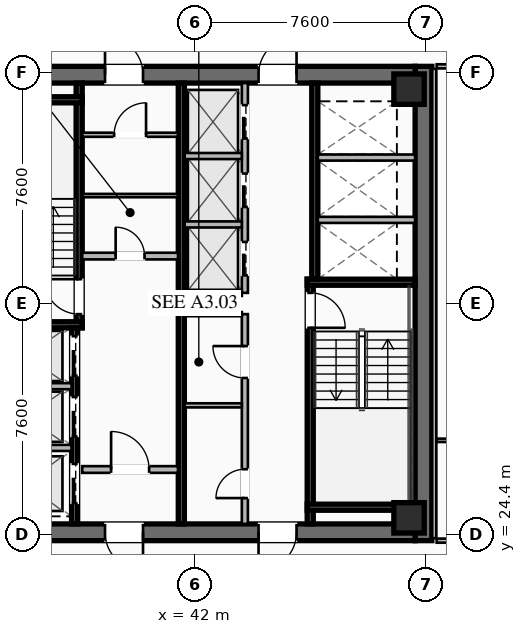
"""IFC4 building model, lengths in metres.
Left out: names, types, materials, properties, quantities, classifications, styles, units other than length and angle.
Written with IfcOpenShell. Run it as: python <this file> out.ifc"""

import sys

from ifc_helpers import new_model, si_unit, direction, frame, frame_2d, origin, origin_2d, place, context, subcontext, project, spatial, rectangle, hollow_rectangle, extrude, element, fill, save


model = new_model("IFC4")
c1 = context("Model", 3, precision=1e-05, world=origin(), true_north=direction((0.0, 1.0)))
c2 = subcontext(c1, "Body", "Model", "MODEL_VIEW")
j1 = project(units=[si_unit("LENGTHUNIT", "METRE"), si_unit("PLANEANGLEUNIT", "RADIAN")], contexts=[c1])
p1 = place(None, origin())
s1 = spatial("IfcSite", under=j1, at=p1, CompositionType="ELEMENT")
p2 = place(p1, origin())
s2 = spatial("IfcBuilding", under=s1, at=p2, CompositionType="ELEMENT")
p3 = place(p2, frame((0.0, 0.0, 128.6)))
s3 = spatial("IfcBuildingStorey", under=s2, at=p3, CompositionType="ELEMENT", Elevation=128.6)
p4 = place(p3, frame((49.525, 39.8, 0.0), z_axis=(0.0, 0.0, 1.0), x_axis=(0.0, -1.0, 0.0)))
e1 = element("IfcWall", 1, at=p4, inside=s3, PredefinedType="SHEAR", context=c2, shape_type="SweptSolid", body=[
    extrude(rectangle(XDim=15.6, YDim=0.55, at=frame_2d((7.8, 0.0))), origin(), (0.0, 0.0, 1.0), 3.55),
])
p5 = place(p3, frame((49.25, 24.475, 0.0), z_axis=(0.0, 0.0, 1.0), x_axis=(-1.0, 0.0, 0.0)))
e2 = element("IfcWall", 2, at=p5, inside=s3, PredefinedType="SHEAR", context=c2, shape_type="SweptSolid", body=[
    extrude(rectangle(XDim=14.5, YDim=0.55, at=frame_2d((7.25, 0.0))), origin(), (0.0, 0.0, 1.0), 3.55),
])
p6 = place(p5, frame((8.95, 0.0, 0.0)))
e3 = element("IfcOpeningElement", 3, at=p6, cuts=e2, PredefinedType="OPENING", context=c2, shape_type="SweptSolid", body=[
    extrude(rectangle(XDim=1.25, YDim=2.25, at=frame_2d((0.625, 1.125))), frame((0.0, 0.285, 0.0), z_axis=(0.0, -1.0, 0.0), x_axis=(1.0, 0.0, 0.0)), (0.0, 0.0, 1.0), 0.57),
])
p7 = place(p5, frame((3.9, 0.0, 0.0)))
e4 = element("IfcOpeningElement", 4, at=p7, cuts=e2, PredefinedType="OPENING", context=c2, shape_type="SweptSolid", body=[
    extrude(rectangle(XDim=1.25, YDim=2.25, at=frame_2d((0.625, 1.125))), frame((0.0, 0.285, 0.0), z_axis=(0.0, -1.0, 0.0), x_axis=(1.0, 0.0, 0.0)), (0.0, 0.0, 1.0), 0.57),
])
p8 = place(p3, frame((34.75, 39.525, 0.0), z_axis=(0.0, 0.0, 1.0), x_axis=(1.0, 0.0, 0.0)))
e5 = element("IfcWall", 5, at=p8, inside=s3, PredefinedType="SHEAR", context=c2, shape_type="SweptSolid", body=[
    extrude(rectangle(XDim=14.5, YDim=0.55, at=frame_2d((7.25, 0.0))), origin(), (0.0, 0.0, 1.0), 3.55),
])
p9 = place(p8, frame((4.3, 0.0, 0.0)))
e6 = element("IfcOpeningElement", 6, at=p9, cuts=e5, PredefinedType="OPENING", context=c2, shape_type="SweptSolid", body=[
    extrude(rectangle(XDim=1.25, YDim=2.25, at=frame_2d((0.625, 1.125))), frame((0.0, 0.285, 0.0), z_axis=(0.0, -1.0, 0.0), x_axis=(1.0, 0.0, 0.0)), (0.0, 0.0, 1.0), 0.57),
])
p10 = place(p8, frame((9.35, 0.0, 0.0)))
e7 = element("IfcOpeningElement", 7, at=p10, cuts=e5, PredefinedType="OPENING", context=c2, shape_type="SweptSolid", body=[
    extrude(rectangle(XDim=1.25, YDim=2.25, at=frame_2d((0.625, 1.125))), frame((0.0, 0.285, 0.0), z_axis=(0.0, -1.0, 0.0), x_axis=(1.0, 0.0, 0.0)), (0.0, 0.0, 1.0), 0.57),
])
for number, where, z_axis, x_axis in (
    (8, (49.05, 24.95, 0.0), (0.0, 0.0, 1.0), (1.0, 0.0, 0.0)),
    (9, (49.05, 39.05, 0.0), (0.0, 0.0, 1.0), (1.0, 0.0, 0.0)),
):
    element("IfcColumn", number, at=place(p3, frame(where, z_axis=z_axis, x_axis=x_axis)), inside=s3, PredefinedType="COLUMN", context=c2, shape_type="SweptSolid", body=[
        extrude(hollow_rectangle(XDim=1.0, YDim=1.0, WallThickness=0.04, at=origin_2d()), origin(), (0.0, 0.0, 1.0), 3.37),
    ])
p11 = place(p3, frame((38.2, 31.2, 0.0), z_axis=(0.0, 0.0, 1.0), x_axis=(0.0, 1.0, 0.0)))
e10 = element("IfcWall", 10, at=p11, inside=s3, PredefinedType="SHEAR", context=c2, shape_type="SweptSolid", body=[
    extrude(rectangle(XDim=8.05, YDim=0.2, at=frame_2d((4.025, 0.0))), origin(), (0.0, 0.0, 1.0), 3.37),
])
p12 = place(p11, frame((0.45, 0.0, 0.0)))
e11 = element("IfcOpeningElement", 11, at=p12, cuts=e10, PredefinedType="OPENING", context=c2, shape_type="SweptSolid", body=[
    extrude(rectangle(XDim=1.15, YDim=2.2, at=frame_2d((0.575, 1.1))), frame((0.0, 0.11, 0.0), z_axis=(0.0, -1.0, 0.0), x_axis=(1.0, 0.0, 0.0)), (0.0, 0.0, 1.0), 0.22),
])
for number, where, z_axis, x_axis in (
    (12, (34.75, 31.3, 0.0), (0.0, 0.0, 1.0), (1.0, 0.0, 0.0)),
    (13, (34.75, 38.7, 0.0), (0.0, 0.0, 1.0), (1.0, 0.0, 0.0)),
):
    element("IfcWall", number, at=place(p3, frame(where, z_axis=z_axis, x_axis=x_axis)), inside=s3, PredefinedType="SHEAR", context=c2, shape_type="SweptSolid", body=[
        extrude(rectangle(XDim=3.55, YDim=0.2, at=frame_2d((1.775, 0.0))), origin(), (0.0, 0.0, 1.0), 3.37),
    ])
p13 = place(p3, frame((45.8, 32.8, 0.0), z_axis=(0.0, 0.0, 1.0), x_axis=(0.0, -1.0, 0.0)))
e14 = element("IfcWall", 14, at=p13, inside=s3, PredefinedType="SHEAR", context=c2, shape_type="SweptSolid", body=[
    extrude(rectangle(XDim=8.05, YDim=0.2, at=frame_2d((4.025, 0.0))), origin(), (0.0, 0.0, 1.0), 3.37),
])
p14 = place(p13, frame((0.45, 0.0, 0.0)))
e15 = element("IfcOpeningElement", 15, at=p14, cuts=e14, PredefinedType="OPENING", context=c2, shape_type="SweptSolid", body=[
    extrude(rectangle(XDim=1.15, YDim=2.2, at=frame_2d((0.575, 1.1))), frame((0.0, 0.11, 0.0), z_axis=(0.0, -1.0, 0.0), x_axis=(1.0, 0.0, 0.0)), (0.0, 0.0, 1.0), 0.22),
])
for number, where, z_axis, x_axis in (
    (16, (45.7, 32.7, 0.0), (0.0, 0.0, 1.0), (1.0, 0.0, 0.0)),
    (17, (45.7, 25.3, 0.0), (0.0, 0.0, 1.0), (1.0, 0.0, 0.0)),
):
    element("IfcWall", number, at=place(p3, frame(where, z_axis=z_axis, x_axis=x_axis)), inside=s3, PredefinedType="SHEAR", context=c2, shape_type="SweptSolid", body=[
        extrude(rectangle(XDim=3.55, YDim=0.2, at=frame_2d((1.775, 0.0))), origin(), (0.0, 0.0, 1.0), 3.37),
    ])
p15 = place(p3, frame((41.56, 24.75, 0.0), z_axis=(0.0, 0.0, 1.0), x_axis=(0.0, 1.0, 0.0)))
e18 = element("IfcWall", 18, at=p15, inside=s3, PredefinedType="SHEAR", context=c2, shape_type="SweptSolid", body=[
    extrude(rectangle(XDim=14.5, YDim=0.2, at=frame_2d((7.25, 0.0))), origin(), (0.0, 0.0, 1.0), 3.37),
])
p16 = place(p3, frame((38.3, 33.56, 0.0), z_axis=(0.0, 0.0, 1.0), x_axis=(1.0, 0.0, 0.0)))
e19 = element("IfcWall", 19, at=p16, inside=s3, PredefinedType="SOLIDWALL", context=c2, shape_type="SweptSolid", body=[
    extrude(rectangle(XDim=3.15, YDim=0.22, at=frame_2d((1.575, 0.0))), origin(), (0.0, 0.0, 1.0), 2.723),
])
p17 = place(p16, frame((1.1, 0.0, 0.0)))
e20 = element("IfcOpeningElement", 20, at=p17, cuts=e19, PredefinedType="OPENING", context=c2, shape_type="SweptSolid", body=[
    extrude(rectangle(XDim=0.95, YDim=2.05, at=frame_2d((0.475, 1.025))), frame((0.0, 0.12, 0.0), z_axis=(0.0, -1.0, 0.0), x_axis=(1.0, 0.0, 0.0)), (0.0, 0.0, 1.0), 0.24),
])
p18 = place(p3, frame((38.3, 26.54, 0.0), z_axis=(0.0, 0.0, 1.0), x_axis=(1.0, 0.0, 0.0)))
e21 = element("IfcWall", 21, at=p18, inside=s3, PredefinedType="SOLIDWALL", context=c2, shape_type="SweptSolid", body=[
    extrude(rectangle(XDim=3.15, YDim=0.22, at=frame_2d((1.575, 0.0))), origin(), (0.0, 0.0, 1.0), 2.723),
])
p19 = place(p18, frame((0.95, 0.0, 0.0)))
e22 = element("IfcOpeningElement", 22, at=p19, cuts=e21, PredefinedType="OPENING", context=c2, shape_type="SweptSolid", body=[
    extrude(rectangle(XDim=1.25, YDim=2.25, at=frame_2d((0.625, 1.125))), frame((0.0, 0.12, 0.0), z_axis=(0.0, -1.0, 0.0), x_axis=(1.0, 0.0, 0.0)), (0.0, 0.0, 1.0), 0.24),
])
p20 = place(p3, frame((38.05, 24.75, 0.0), z_axis=(0.0, 0.0, 1.0), x_axis=(0.0, 1.0, 0.0)))
e23 = element("IfcWall", 23, at=p20, inside=s3, PredefinedType="SHEAR", context=c2, shape_type="SweptSolid", body=[
    extrude(rectangle(XDim=6.45, YDim=0.2, at=frame_2d((3.225, 0.0))), origin(), (0.0, 0.0, 1.0), 3.37),
])
p21 = place(p20, frame((4.875, 0.0, 0.0)))
e24 = element("IfcOpeningElement", 24, at=p21, cuts=e23, PredefinedType="OPENING", context=c2, shape_type="SweptSolid", body=[
    extrude(rectangle(XDim=1.3, YDim=2.25, at=frame_2d((0.65, 1.125))), frame((0.0, 0.11, 0.0), z_axis=(0.0, -1.0, 0.0), x_axis=(1.0, 0.0, 0.0)), (0.0, 0.0, 1.0), 0.22),
])
p22 = place(p20, frame((2.875, 0.0, 0.0)))
e25 = element("IfcOpeningElement", 25, at=p22, cuts=e23, PredefinedType="OPENING", context=c2, shape_type="SweptSolid", body=[
    extrude(rectangle(XDim=1.3, YDim=2.25, at=frame_2d((0.65, 1.125))), frame((0.0, 0.11, 0.0), z_axis=(0.0, -1.0, 0.0), x_axis=(1.0, 0.0, 0.0)), (0.0, 0.0, 1.0), 0.22),
])
p23 = place(p20, frame((0.675, 0.0, 0.0)))
e26 = element("IfcOpeningElement", 26, at=p23, cuts=e23, PredefinedType="OPENING", context=c2, shape_type="SweptSolid", body=[
    extrude(rectangle(XDim=1.3, YDim=2.25, at=frame_2d((0.65, 1.125))), frame((0.0, 0.11, 0.0), z_axis=(0.0, -1.0, 0.0), x_axis=(1.0, 0.0, 0.0)), (0.0, 0.0, 1.0), 0.22),
])
for number, where, z_axis, x_axis in (
    (27, (34.75, 27.25, 0.0), (0.0, 0.0, 1.0), (1.0, 0.0, 0.0)),
    (28, (34.75, 29.28, 0.0), (0.0, 0.0, 1.0), (1.0, 0.0, 0.0)),
):
    element("IfcWall", number, at=place(p3, frame(where, z_axis=z_axis, x_axis=x_axis)), inside=s3, PredefinedType="SOLIDWALL", context=c2, shape_type="SweptSolid", body=[
        extrude(rectangle(XDim=3.2, YDim=0.2, at=frame_2d((1.6, 0.0))), origin(), (0.0, 0.0, 1.0), 3.37),
    ])
p24 = place(p3, frame((45.95, 39.25, 0.0), z_axis=(0.0, 0.0, 1.0), x_axis=(0.0, -1.0, 0.0)))
e29 = element("IfcWall", 29, at=p24, inside=s3, PredefinedType="SHEAR", context=c2, shape_type="SweptSolid", body=[
    extrude(rectangle(XDim=6.45, YDim=0.2, at=frame_2d((3.225, 0.0))), origin(), (0.0, 0.0, 1.0), 3.37),
])
for number, where, z_axis, x_axis in (
    (30, (46.05, 34.75, 0.0), (0.0, 0.0, 1.0), (1.0, 0.0, 0.0)),
    (31, (46.05, 36.8, 0.0), (0.0, 0.0, 1.0), (1.0, 0.0, 0.0)),
):
    element("IfcWall", number, at=place(p3, frame(where, z_axis=z_axis, x_axis=x_axis)), inside=s3, PredefinedType="SOLIDWALL", context=c2, shape_type="SweptSolid", body=[
        extrude(rectangle(XDim=3.2, YDim=0.2, at=frame_2d((1.6, 0.0))), origin(), (0.0, 0.0, 1.0), 3.37),
    ])
p25 = place(p3, frame((38.3, 37.55, 0.0), z_axis=(0.0, 0.0, 1.0), x_axis=(1.0, 0.0, 0.0)))
e32 = element("IfcWall", 32, at=p25, inside=s3, PredefinedType="PARTITIONING", context=c2, shape_type="SweptSolid", body=[
    extrude(rectangle(XDim=3.15, YDim=0.135, at=frame_2d((1.575, 0.0))), origin(), (0.0, 0.0, 1.0), 2.723),
])
p26 = place(p25, frame((1.05, 0.0, 0.0)))
e33 = element("IfcOpeningElement", 33, at=p26, cuts=e32, PredefinedType="OPENING", context=c2, shape_type="SweptSolid", body=[
    extrude(rectangle(XDim=1.05, YDim=2.2, at=frame_2d((0.525, 1.1))), frame((0.0, 0.077, 0.0), z_axis=(0.0, -1.0, 0.0), x_axis=(1.0, 0.0, 0.0)), (0.0, 0.0, 1.0), 0.155),
])
p27 = place(p3, frame((38.3, 35.55, 0.0), z_axis=(0.0, 0.0, 1.0), x_axis=(1.0, 0.0, 0.0)))
e34 = element("IfcWall", 34, at=p27, inside=s3, PredefinedType="PARTITIONING", context=c2, shape_type="SweptSolid", body=[
    extrude(rectangle(XDim=3.15, YDim=0.11, at=frame_2d((1.575, 0.0))), origin(), (0.0, 0.0, 1.0), 2.723),
])
p28 = place(p3, frame((43.65, 24.75, 0.0), z_axis=(0.0, 0.0, 1.0), x_axis=(0.0, 1.0, 0.0)))
e35 = element("IfcWall", 35, at=p28, inside=s3, PredefinedType="SOLIDWALL", context=c2, shape_type="SweptSolid", body=[
    extrude(rectangle(XDim=6.9, YDim=0.2, at=frame_2d((3.45, 0.0))), origin(), (0.0, 0.0, 1.0), 2.723),
])
p29 = place(p28, frame((0.85, 0.0, 0.0)))
e36 = element("IfcOpeningElement", 36, at=p29, cuts=e35, PredefinedType="OPENING", context=c2, shape_type="SweptSolid", body=[
    extrude(rectangle(XDim=0.95, YDim=2.05, at=frame_2d((0.475, 1.025))), frame((0.0, 0.11, 0.0), z_axis=(0.0, -1.0, 0.0), x_axis=(1.0, 0.0, 0.0)), (0.0, 0.0, 1.0), 0.22),
])
p30 = place(p28, frame((4.8, 0.0, 0.0)))
e37 = element("IfcOpeningElement", 37, at=p30, cuts=e35, PredefinedType="OPENING", context=c2, shape_type="SweptSolid", body=[
    extrude(rectangle(XDim=1.05, YDim=2.2, at=frame_2d((0.525, 1.1))), frame((0.0, 0.11, 0.0), z_axis=(0.0, -1.0, 0.0), x_axis=(1.0, 0.0, 0.0)), (0.0, 0.0, 1.0), 0.22),
])
for number, where, z_axis, x_axis in (
    (38, (41.67, 31.65, 0.0), (0.0, 0.0, 1.0), (1.0, 0.0, 0.0)),
    (39, (41.67, 28.65, 0.0), (0.0, 0.0, 1.0), (1.0, 0.0, 0.0)),
):
    element("IfcWall", number, at=place(p3, frame(where, z_axis=z_axis, x_axis=x_axis)), inside=s3, PredefinedType="PARTITIONING", context=c2, shape_type="SweptSolid", body=[
        extrude(rectangle(XDim=1.88, YDim=0.135, at=frame_2d((0.94, 0.0))), origin(), (0.0, 0.0, 1.0), 2.723),
    ])
p31 = place(p3, frame((43.65, 32.35, 0.0), z_axis=(0.0, 0.0, 1.0), x_axis=(0.0, 1.0, 0.0)))
e40 = element("IfcWall", 40, at=p31, inside=s3, PredefinedType="SOLIDWALL", context=c2, shape_type="SweptSolid", body=[
    extrude(rectangle(XDim=6.9, YDim=0.2, at=frame_2d((3.45, 0.0))), origin(), (0.0, 0.0, 1.0), 3.37),
])
p32 = place(p31, frame((0.575, 0.0, 0.0)))
e41 = element("IfcOpeningElement", 41, at=p32, cuts=e40, PredefinedType="OPENING", context=c2, shape_type="SweptSolid", body=[
    extrude(rectangle(XDim=1.1, YDim=2.2, at=frame_2d((0.55, 1.1))), frame((0.0, 0.11, 0.0), z_axis=(0.0, -1.0, 0.0), x_axis=(1.0, 0.0, 0.0)), (0.0, 0.0, 1.0), 0.22),
])
p33 = place(p31, frame((2.825, 0.0, 0.0)))
e42 = element("IfcOpeningElement", 42, at=p33, cuts=e40, PredefinedType="OPENING", context=c2, shape_type="SweptSolid", body=[
    extrude(rectangle(XDim=1.1, YDim=2.2, at=frame_2d((0.55, 1.1))), frame((0.0, 0.11, 0.0), z_axis=(0.0, -1.0, 0.0), x_axis=(1.0, 0.0, 0.0)), (0.0, 0.0, 1.0), 0.22),
])
p34 = place(p31, frame((5.075, 0.0, 0.0)))
e43 = element("IfcOpeningElement", 43, at=p34, cuts=e40, PredefinedType="OPENING", context=c2, shape_type="SweptSolid", body=[
    extrude(rectangle(XDim=1.1, YDim=2.2, at=frame_2d((0.55, 1.1))), frame((0.0, 0.11, 0.0), z_axis=(0.0, -1.0, 0.0), x_axis=(1.0, 0.0, 0.0)), (0.0, 0.0, 1.0), 0.22),
])
for number, where, z_axis, x_axis in (
    (44, (41.67, 32.35, 0.0), (0.0, 0.0, 1.0), (1.0, 0.0, 0.0)),
    (45, (41.67, 34.6, 0.0), (0.0, 0.0, 1.0), (1.0, 0.0, 0.0)),
    (46, (41.67, 36.85, 0.0), (0.0, 0.0, 1.0), (1.0, 0.0, 0.0)),
):
    element("IfcWall", number, at=place(p3, frame(where, z_axis=z_axis, x_axis=x_axis)), inside=s3, PredefinedType="SOLIDWALL", context=c2, shape_type="SweptSolid", body=[
        extrude(rectangle(XDim=1.88, YDim=0.2, at=frame_2d((0.94, 0.0))), origin(), (0.0, 0.0, 1.0), 3.37),
    ])
p35 = place(p3, frame((49.88, 39.72, 0.0), z_axis=(0.0, 0.0, 1.0), x_axis=(0.0, -1.0, 0.0)))
e47 = element("IfcWall", 47, at=p35, inside=s3, PredefinedType="PARTITIONING", context=c2, shape_type="SweptSolid", body=[
    extrude(rectangle(XDim=15.44, YDim=0.135, at=frame_2d((7.72, 0.0))), origin(), (0.0, 0.0, 1.0), 2.723),
])
p36 = place(p3, frame((61.28, 39.8, 0.0), z_axis=(0.0, 0.0, 1.0), x_axis=(-1.0, 0.0, 0.0)))
e48 = element("IfcWall", 48, at=p36, inside=s3, PredefinedType="PARTITIONING", context=c2, shape_type="SweptSolid", body=[
    extrude(rectangle(XDim=11.32, YDim=0.135, at=frame_2d((5.66, 0.0))), origin(), (0.0, 0.0, 1.0), 2.723),
])
p37 = place(p36, frame((9.88, 0.0, 0.0)))
e49 = element("IfcOpeningElement", 49, at=p37, cuts=e48, PredefinedType="OPENING", context=c2, shape_type="SweptSolid", body=[
    extrude(rectangle(XDim=0.95, YDim=2.05, at=frame_2d((0.475, 1.025))), frame((0.0, 0.077, 0.0), z_axis=(0.0, -1.0, 0.0), x_axis=(1.0, 0.0, 0.0)), (0.0, 0.0, 1.0), 0.155),
])
p38 = place(p3, frame((49.96, 24.2, 0.0), z_axis=(0.0, 0.0, 1.0), x_axis=(1.0, 0.0, 0.0)))
e50 = element("IfcWall", 50, at=p38, inside=s3, PredefinedType="PARTITIONING", context=c2, shape_type="SweptSolid", body=[
    extrude(rectangle(XDim=11.32, YDim=0.135, at=frame_2d((5.66, 0.0))), origin(), (0.0, 0.0, 1.0), 2.723),
])
p39 = place(p38, frame((0.5, 0.0, 0.0)))
e51 = element("IfcOpeningElement", 51, at=p39, cuts=e50, PredefinedType="OPENING", context=c2, shape_type="SweptSolid", body=[
    extrude(rectangle(XDim=0.95, YDim=2.05, at=frame_2d((0.475, 1.025))), frame((0.0, 0.077, 0.0), z_axis=(0.0, -1.0, 0.0), x_axis=(1.0, 0.0, 0.0)), (0.0, 0.0, 1.0), 0.155),
])
p40 = place(p3, frame((49.96, 27.5, 0.0), z_axis=(0.0, 0.0, 1.0), x_axis=(1.0, 0.0, 0.0)))
e52 = element("IfcWall", 52, at=p40, inside=s3, PredefinedType="PARTITIONING", context=c2, shape_type="SweptSolid", body=[
    extrude(rectangle(XDim=11.32, YDim=0.11, at=frame_2d((5.66, 0.0))), origin(), (0.0, 0.0, 1.0), 2.723),
])
p41 = place(p9, origin())
e53 = element("IfcDoor", 53, at=p41, inside=s3, OperationType="SINGLE_SWING_LEFT", PredefinedType="DOOR", context=c2, shape_type="SweptSolid", body=[
    extrude(rectangle(XDim=1.25, YDim=2.25, at=frame_2d((0.625, 1.125))), frame((0.0, 0.025, 0.0), z_axis=(0.0, -1.0, 0.0), x_axis=(1.0, 0.0, 0.0)), (0.0, 0.0, 1.0), 0.05),
])
fill(e6, e53)
p42 = place(p10, origin())
e54 = element("IfcDoor", 54, at=p42, inside=s3, OperationType="SINGLE_SWING_RIGHT", PredefinedType="DOOR", context=c2, shape_type="SweptSolid", body=[
    extrude(rectangle(XDim=1.25, YDim=2.25, at=frame_2d((0.625, 1.125))), frame((0.0, 0.025, 0.0), z_axis=(0.0, -1.0, 0.0), x_axis=(1.0, 0.0, 0.0)), (0.0, 0.0, 1.0), 0.05),
])
fill(e7, e54)
p43 = place(p6, origin())
e55 = element("IfcDoor", 55, at=p43, inside=s3, OperationType="SINGLE_SWING_LEFT", PredefinedType="DOOR", context=c2, shape_type="SweptSolid", body=[
    extrude(rectangle(XDim=1.25, YDim=2.25, at=frame_2d((0.625, 1.125))), frame((0.0, 0.025, 0.0), z_axis=(0.0, -1.0, 0.0), x_axis=(1.0, 0.0, 0.0)), (0.0, 0.0, 1.0), 0.05),
])
fill(e3, e55)
p44 = place(p7, origin())
e56 = element("IfcDoor", 56, at=p44, inside=s3, OperationType="SINGLE_SWING_RIGHT", PredefinedType="DOOR", context=c2, shape_type="SweptSolid", body=[
    extrude(rectangle(XDim=1.25, YDim=2.25, at=frame_2d((0.625, 1.125))), frame((0.0, 0.025, 0.0), z_axis=(0.0, -1.0, 0.0), x_axis=(1.0, 0.0, 0.0)), (0.0, 0.0, 1.0), 0.05),
])
fill(e4, e56)
p45 = place(p12, origin())
e57 = element("IfcDoor", 57, at=p45, inside=s3, OperationType="SINGLE_SWING_RIGHT", PredefinedType="DOOR", context=c2, shape_type="SweptSolid", body=[
    extrude(rectangle(XDim=1.15, YDim=2.2, at=frame_2d((0.575, 1.1))), frame((0.0, 0.025, 0.0), z_axis=(0.0, -1.0, 0.0), x_axis=(1.0, 0.0, 0.0)), (0.0, 0.0, 1.0), 0.05),
])
fill(e11, e57)
p46 = place(p14, origin())
e58 = element("IfcDoor", 58, at=p46, inside=s3, OperationType="SINGLE_SWING_RIGHT", PredefinedType="DOOR", context=c2, shape_type="SweptSolid", body=[
    extrude(rectangle(XDim=1.15, YDim=2.2, at=frame_2d((0.575, 1.1))), frame((0.0, 0.025, 0.0), z_axis=(0.0, -1.0, 0.0), x_axis=(1.0, 0.0, 0.0)), (0.0, 0.0, 1.0), 0.05),
])
fill(e15, e58)
p47 = place(p19, origin())
e59 = element("IfcDoor", 59, at=p47, inside=s3, OperationType="SINGLE_SWING_LEFT", PredefinedType="DOOR", context=c2, shape_type="SweptSolid", body=[
    extrude(rectangle(XDim=1.25, YDim=2.25, at=frame_2d((0.625, 1.125))), frame((0.0, 0.025, 0.0), z_axis=(0.0, -1.0, 0.0), x_axis=(1.0, 0.0, 0.0)), (0.0, 0.0, 1.0), 0.05),
])
fill(e22, e59)
p48 = place(p26, origin())
e60 = element("IfcDoor", 60, at=p48, inside=s3, OperationType="SINGLE_SWING_RIGHT", PredefinedType="DOOR", context=c2, shape_type="SweptSolid", body=[
    extrude(rectangle(XDim=1.05, YDim=2.2, at=frame_2d((0.525, 1.1))), frame((0.0, 0.025, 0.0), z_axis=(0.0, -1.0, 0.0), x_axis=(1.0, 0.0, 0.0)), (0.0, 0.0, 1.0), 0.05),
])
fill(e33, e60)
p49 = place(p17, origin())
e61 = element("IfcDoor", 61, at=p49, inside=s3, OperationType="SINGLE_SWING_LEFT", PredefinedType="DOOR", context=c2, shape_type="SweptSolid", body=[
    extrude(rectangle(XDim=0.95, YDim=2.05, at=frame_2d((0.475, 1.025))), frame((0.0, 0.025, 0.0), z_axis=(0.0, -1.0, 0.0), x_axis=(1.0, 0.0, 0.0)), (0.0, 0.0, 1.0), 0.05),
])
fill(e20, e61)
p50 = place(p29, origin())
e62 = element("IfcDoor", 62, at=p50, inside=s3, OperationType="SINGLE_SWING_LEFT", PredefinedType="DOOR", context=c2, shape_type="SweptSolid", body=[
    extrude(rectangle(XDim=0.95, YDim=2.05, at=frame_2d((0.475, 1.025))), frame((0.0, 0.025, 0.0), z_axis=(0.0, -1.0, 0.0), x_axis=(1.0, 0.0, 0.0)), (0.0, 0.0, 1.0), 0.05),
])
fill(e36, e62)
p51 = place(p30, origin())
e63 = element("IfcDoor", 63, at=p51, inside=s3, OperationType="SINGLE_SWING_RIGHT", PredefinedType="DOOR", context=c2, shape_type="SweptSolid", body=[
    extrude(rectangle(XDim=1.05, YDim=2.2, at=frame_2d((0.525, 1.1))), frame((0.0, 0.025, 0.0), z_axis=(0.0, -1.0, 0.0), x_axis=(1.0, 0.0, 0.0)), (0.0, 0.0, 1.0), 0.05),
])
fill(e37, e63)
p52 = place(p21, origin())
e64 = element("IfcDoor", 64, at=p52, inside=s3, OperationType="SLIDING_TO_LEFT", PredefinedType="DOOR", context=c2, shape_type="SweptSolid", body=[
    extrude(rectangle(XDim=1.3, YDim=2.25, at=frame_2d((0.65, 1.125))), frame((0.0, 0.025, 0.0), z_axis=(0.0, -1.0, 0.0), x_axis=(1.0, 0.0, 0.0)), (0.0, 0.0, 1.0), 0.05),
])
fill(e24, e64)
p53 = place(p22, origin())
e65 = element("IfcDoor", 65, at=p53, inside=s3, OperationType="SLIDING_TO_LEFT", PredefinedType="DOOR", context=c2, shape_type="SweptSolid", body=[
    extrude(rectangle(XDim=1.3, YDim=2.25, at=frame_2d((0.65, 1.125))), frame((0.0, 0.025, 0.0), z_axis=(0.0, -1.0, 0.0), x_axis=(1.0, 0.0, 0.0)), (0.0, 0.0, 1.0), 0.05),
])
fill(e25, e65)
p54 = place(p23, origin())
e66 = element("IfcDoor", 66, at=p54, inside=s3, OperationType="SLIDING_TO_LEFT", PredefinedType="DOOR", context=c2, shape_type="SweptSolid", body=[
    extrude(rectangle(XDim=1.3, YDim=2.25, at=frame_2d((0.65, 1.125))), frame((0.0, 0.025, 0.0), z_axis=(0.0, -1.0, 0.0), x_axis=(1.0, 0.0, 0.0)), (0.0, 0.0, 1.0), 0.05),
])
fill(e26, e66)
p55 = place(p32, origin())
e67 = element("IfcDoor", 67, at=p55, inside=s3, OperationType="SLIDING_TO_LEFT", PredefinedType="DOOR", context=c2, shape_type="SweptSolid", body=[
    extrude(rectangle(XDim=1.1, YDim=2.2, at=frame_2d((0.55, 1.1))), frame((0.0, 0.025, 0.0), z_axis=(0.0, -1.0, 0.0), x_axis=(1.0, 0.0, 0.0)), (0.0, 0.0, 1.0), 0.05),
])
fill(e41, e67)
p56 = place(p33, origin())
e68 = element("IfcDoor", 68, at=p56, inside=s3, OperationType="SLIDING_TO_LEFT", PredefinedType="DOOR", context=c2, shape_type="SweptSolid", body=[
    extrude(rectangle(XDim=1.1, YDim=2.2, at=frame_2d((0.55, 1.1))), frame((0.0, 0.025, 0.0), z_axis=(0.0, -1.0, 0.0), x_axis=(1.0, 0.0, 0.0)), (0.0, 0.0, 1.0), 0.05),
])
fill(e42, e68)
p57 = place(p34, origin())
e69 = element("IfcDoor", 69, at=p57, inside=s3, OperationType="SLIDING_TO_LEFT", PredefinedType="DOOR", context=c2, shape_type="SweptSolid", body=[
    extrude(rectangle(XDim=1.1, YDim=2.2, at=frame_2d((0.55, 1.1))), frame((0.0, 0.025, 0.0), z_axis=(0.0, -1.0, 0.0), x_axis=(1.0, 0.0, 0.0)), (0.0, 0.0, 1.0), 0.05),
])
fill(e43, e69)
save(model, sys.argv[1])
